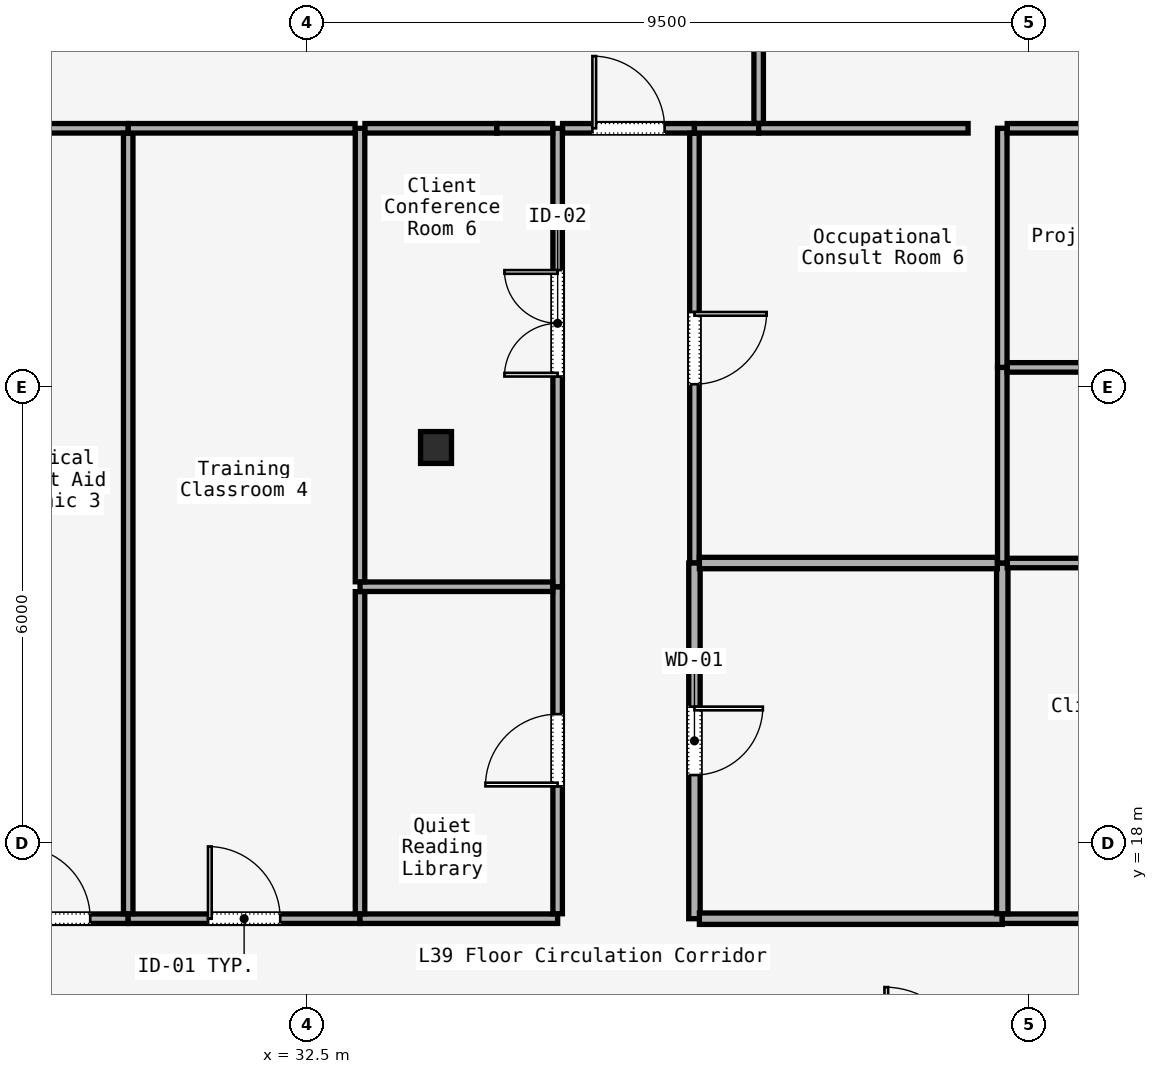
"""IFC4 building model, lengths in metres.
Left out: names, types, materials, properties, quantities, classifications, styles, units other than length and angle.
Written with IfcOpenShell. Run it as: python <this file> out.ifc"""

import sys

from ifc_helpers import new_model, si_unit, direction, frame, frame_2d, origin, origin_2d, place, context, subcontext, project, spatial, rectangle, i_section, extrude, element, fill, save


model = new_model("IFC4")
c1 = context("Model", 3, precision=1e-05, world=origin(), true_north=direction((0.0, 1.0)))
c2 = subcontext(c1, "Body", "Model", "MODEL_VIEW")
j1 = project(units=[si_unit("LENGTHUNIT", "METRE"), si_unit("PLANEANGLEUNIT", "RADIAN")], contexts=[c1])
p1 = place(None, origin())
s1 = spatial("IfcSite", under=j1, at=p1, CompositionType="ELEMENT")
p2 = place(p1, origin())
s2 = spatial("IfcBuilding", under=s1, at=p2, CompositionType="ELEMENT")
p3 = place(p2, frame((0.0, 0.0, 165.0)))
s3 = spatial("IfcBuildingStorey", under=s2, at=p3, CompositionType="ELEMENT", Elevation=165.0)
p4 = place(p3, frame((34.2, 23.2, 0.0), z_axis=(0.0, 0.0, 1.0), x_axis=(1.0, 0.0, 0.0)))
e1 = element("IfcColumn", 1, at=p4, inside=s3, PredefinedType="COLUMN", context=c2, shape_type="SweptSolid", body=[
    extrude(i_section(OverallWidth=0.407, OverallDepth=0.419, WebThickness=0.031, FlangeThickness=0.049, FilletRadius=0.015, at=origin_2d()), origin(), (0.0, 0.0, 1.0), 3.58),
])
p5 = place(p3, frame((28.2, 17.0, 0.0), z_axis=(0.0, 0.0, 1.0), x_axis=(1.0, 0.0, 0.0)))
e2 = element("IfcWall", 2, at=p5, inside=s3, PredefinedType="PARTITIONING", context=c2, shape_type="SweptSolid", body=[
    extrude(rectangle(XDim=1.95, YDim=0.125, at=frame_2d((0.975, 0.0))), origin(), (0.0, 0.0, 1.0), 3.01),
])
p6 = place(p5, frame((0.5, 0.0, 0.0)))
e3 = element("IfcOpeningElement", 3, at=p6, cuts=e2, PredefinedType="OPENING", context=c2, shape_type="SweptSolid", body=[
    extrude(rectangle(XDim=0.95, YDim=2.2, at=frame_2d((0.475, 1.1))), frame((0.0, 0.062, 0.0), z_axis=(0.0, -1.0, 0.0), x_axis=(1.0, 0.0, 0.0)), (0.0, 0.0, 1.0), 0.125),
])
p7 = place(p3, frame((30.15, 17.0, 0.0), z_axis=(0.0, 0.0, 1.0), x_axis=(1.0, 0.0, 0.0)))
e4 = element("IfcWall", 4, at=p7, inside=s3, PredefinedType="PARTITIONING", context=c2, shape_type="SweptSolid", body=[
    extrude(rectangle(XDim=3.05, YDim=0.125, at=frame_2d((1.525, 0.0))), origin(), (0.0, 0.0, 1.0), 3.01),
])
p8 = place(p7, frame((1.05, 0.0, 0.0)))
e5 = element("IfcOpeningElement", 5, at=p8, cuts=e4, PredefinedType="OPENING", context=c2, shape_type="SweptSolid", body=[
    extrude(rectangle(XDim=0.95, YDim=2.2, at=frame_2d((0.475, 1.1))), frame((0.0, 0.062, 0.0), z_axis=(0.0, -1.0, 0.0), x_axis=(1.0, 0.0, 0.0)), (0.0, 0.0, 1.0), 0.125),
])
p9 = place(p3, frame((33.2, 17.0, 0.0), z_axis=(0.0, 0.0, 1.0), x_axis=(1.0, 0.0, 0.0)))
e6 = element("IfcWall", 6, at=p9, inside=s3, PredefinedType="PARTITIONING", context=c2, shape_type="SweptSolid", body=[
    extrude(rectangle(XDim=2.6, YDim=0.125, at=frame_2d((1.3, 0.0))), origin(), (0.0, 0.0, 1.0), 3.01),
])
p10 = place(p3, frame((35.8, 17.065, 0.0), z_axis=(0.0, 0.0, 1.0), x_axis=(0.0, 1.0, 0.0)))
e7 = element("IfcWall", 7, at=p10, inside=s3, PredefinedType="PARTITIONING", context=c2, shape_type="SweptSolid", body=[
    extrude(rectangle(XDim=4.303, YDim=0.125, at=frame_2d((2.151, 0.0))), origin(), (0.0, 0.0, 1.0), 3.01),
])
p11 = place(p10, frame((1.677, 0.0, 0.0)))
e8 = element("IfcOpeningElement", 8, at=p11, cuts=e7, PredefinedType="OPENING", context=c2, shape_type="SweptSolid", body=[
    extrude(rectangle(XDim=0.95, YDim=2.2, at=frame_2d((0.475, 1.1))), frame((0.0, 0.062, 0.0), z_axis=(0.0, -1.0, 0.0), x_axis=(1.0, 0.0, 0.0)), (0.0, 0.0, 1.0), 0.125),
])
p12 = place(p3, frame((35.8, 21.368, 0.0), z_axis=(0.0, 0.0, 1.0), x_axis=(0.0, 1.0, 0.0)))
e9 = element("IfcWall", 9, at=p12, inside=s3, PredefinedType="PARTITIONING", context=c2, shape_type="SweptSolid", body=[
    extrude(rectangle(XDim=6.032, YDim=0.125, at=frame_2d((3.016, 0.0))), origin(), (0.0, 0.0, 1.0), 3.01),
])
p13 = place(p12, frame((2.766, 0.0, 0.0)))
e10 = element("IfcOpeningElement", 10, at=p13, cuts=e9, PredefinedType="OPENING", context=c2, shape_type="SweptSolid", body=[
    extrude(rectangle(XDim=1.4, YDim=2.2, at=frame_2d((0.7, 1.1))), frame((0.0, 0.062, 0.0), z_axis=(0.0, -1.0, 0.0), x_axis=(1.0, 0.0, 0.0)), (0.0, 0.0, 1.0), 0.125),
])
p14 = place(p3, frame((35.865, 27.4, 0.0), z_axis=(0.0, 0.0, 1.0), x_axis=(1.0, 0.0, 0.0)))
e11 = element("IfcWall", 11, at=p14, inside=s3, PredefinedType="PARTITIONING", context=c2, shape_type="SweptSolid", body=[
    extrude(rectangle(XDim=1.735, YDim=0.125, at=frame_2d((0.868, 0.0))), origin(), (0.0, 0.0, 1.0), 3.01),
])
p15 = place(p14, frame((0.393, 0.0, 0.0)))
e12 = element("IfcOpeningElement", 12, at=p15, cuts=e11, PredefinedType="OPENING", context=c2, shape_type="SweptSolid", body=[
    extrude(rectangle(XDim=0.95, YDim=2.2, at=frame_2d((0.475, 1.1))), frame((0.0, 0.062, 0.0), z_axis=(0.0, -1.0, 0.0), x_axis=(1.0, 0.0, 0.0)), (0.0, 0.0, 1.0), 0.125),
])
p16 = place(p3, frame((37.6, 27.335, 0.0), z_axis=(0.0, 0.0, 1.0), x_axis=(0.0, -1.0, 0.0)))
e13 = element("IfcWall", 13, at=p16, inside=s3, PredefinedType="PARTITIONING", context=c2, shape_type="SweptSolid", body=[
    extrude(rectangle(XDim=5.655, YDim=0.125, at=frame_2d((2.828, 0.0))), origin(), (0.0, 0.0, 1.0), 3.01),
])
p17 = place(p16, frame((2.353, 0.0, 0.0)))
e14 = element("IfcOpeningElement", 14, at=p17, cuts=e13, PredefinedType="OPENING", context=c2, shape_type="SweptSolid", body=[
    extrude(rectangle(XDim=0.95, YDim=2.2, at=frame_2d((0.475, 1.1))), frame((0.0, 0.062, 0.0), z_axis=(0.0, -1.0, 0.0), x_axis=(1.0, 0.0, 0.0)), (0.0, 0.0, 1.0), 0.125),
])
p18 = place(p3, frame((37.6, 21.68, 0.0), z_axis=(0.0, 0.0, 1.0), x_axis=(0.0, -1.0, 0.0)))
e15 = element("IfcWall", 15, at=p18, inside=s3, PredefinedType="PARTITIONING", context=c2, shape_type="SweptSolid", body=[
    extrude(rectangle(XDim=4.68, YDim=0.15, at=frame_2d((2.34, 0.0))), origin(), (0.0, 0.0, 1.0), 3.01),
])
p19 = place(p18, frame((1.89, 0.0, 0.0)))
e16 = element("IfcOpeningElement", 16, at=p19, cuts=e15, PredefinedType="OPENING", context=c2, shape_type="SweptSolid", body=[
    extrude(rectangle(XDim=0.9, YDim=2.15, at=frame_2d((0.45, 1.075))), frame((0.0, 0.075, 0.0), z_axis=(0.0, -1.0, 0.0), x_axis=(1.0, 0.0, 0.0)), (0.0, 0.0, 1.0), 0.15),
])
p20 = place(p3, frame((37.665, 17.0, 0.0), z_axis=(0.0, 0.0, 1.0), x_axis=(1.0, 0.0, 0.0)))
e17 = element("IfcWall", 17, at=p20, inside=s3, PredefinedType="PARTITIONING", context=c2, shape_type="SweptSolid", body=[
    extrude(rectangle(XDim=3.985, YDim=0.15, at=frame_2d((1.992, 0.0))), origin(), (0.0, 0.0, 1.0), 3.01),
])
p21 = place(p3, frame((41.65, 17.0, 0.0), z_axis=(0.0, 0.0, 1.0), x_axis=(1.0, 0.0, 0.0)))
e18 = element("IfcWall", 18, at=p21, inside=s3, PredefinedType="PARTITIONING", context=c2, shape_type="SweptSolid", body=[
    extrude(rectangle(XDim=4.95, YDim=0.125, at=frame_2d((2.475, 0.0))), origin(), (0.0, 0.0, 1.0), 3.01),
])
p22 = place(p21, frame((1.775, 0.0, 0.0)))
e19 = element("IfcOpeningElement", 19, at=p22, cuts=e18, PredefinedType="OPENING", context=c2, shape_type="SweptSolid", body=[
    extrude(rectangle(XDim=1.4, YDim=2.2, at=frame_2d((0.7, 1.1))), frame((0.0, 0.062, 0.0), z_axis=(0.0, -1.0, 0.0), x_axis=(1.0, 0.0, 0.0)), (0.0, 0.0, 1.0), 0.125),
])
p23 = place(p3, frame((33.2, 21.368, 0.0), z_axis=(0.0, 0.0, 1.0), x_axis=(1.0, 0.0, 0.0)))
e20 = element("IfcWall", 20, at=p23, inside=s3, PredefinedType="PARTITIONING", context=c2, shape_type="SweptSolid", body=[
    extrude(rectangle(XDim=2.535, YDim=0.125, at=frame_2d((1.268, 0.0))), origin(), (0.0, 0.0, 1.0), 3.01),
])
p24 = place(p3, frame((33.2, 17.065, 0.0), z_axis=(0.0, 0.0, 1.0), x_axis=(0.0, 1.0, 0.0)))
e21 = element("IfcWall", 21, at=p24, inside=s3, PredefinedType="PARTITIONING", context=c2, shape_type="SweptSolid", body=[
    extrude(rectangle(XDim=4.238, YDim=0.125, at=frame_2d((2.119, 0.0))), origin(), (0.0, 0.0, 1.0), 3.01),
])
p25 = place(p3, frame((41.65, 21.68, 0.0), z_axis=(0.0, 0.0, 1.0), x_axis=(0.0, -1.0, 0.0)))
e22 = element("IfcWall", 22, at=p25, inside=s3, PredefinedType="PARTITIONING", context=c2, shape_type="SweptSolid", body=[
    extrude(rectangle(XDim=4.615, YDim=0.15, at=frame_2d((2.308, 0.0))), origin(), (0.0, 0.0, 1.0), 3.01),
])
p26 = place(p3, frame((37.665, 21.68, 0.0), z_axis=(0.0, 0.0, 1.0), x_axis=(1.0, 0.0, 0.0)))
e23 = element("IfcWall", 23, at=p26, inside=s3, PredefinedType="PARTITIONING", context=c2, shape_type="SweptSolid", body=[
    extrude(rectangle(XDim=3.92, YDim=0.15, at=frame_2d((1.96, 0.0))), origin(), (0.0, 0.0, 1.0), 3.01),
])
p27 = place(p3, frame((41.715, 21.68, 0.0), z_axis=(0.0, 0.0, 1.0), x_axis=(1.0, 0.0, 0.0)))
e24 = element("IfcWall", 24, at=p27, inside=s3, PredefinedType="PARTITIONING", context=c2, shape_type="SweptSolid", body=[
    extrude(rectangle(XDim=4.82, YDim=0.125, at=frame_2d((2.41, 0.0))), origin(), (0.0, 0.0, 1.0), 3.01),
])
p28 = place(p3, frame((28.2, 27.4, 0.0), z_axis=(0.0, 0.0, 1.0), x_axis=(1.0, 0.0, 0.0)))
e25 = element("IfcWall", 25, at=p28, inside=s3, PredefinedType="PARTITIONING", context=c2, shape_type="SweptSolid", body=[
    extrude(rectangle(XDim=1.95, YDim=0.125, at=frame_2d((0.975, 0.0))), origin(), (0.0, 0.0, 1.0), 3.01),
])
p29 = place(p3, frame((30.15, 27.335, 0.0), z_axis=(0.0, 0.0, 1.0), x_axis=(0.0, -1.0, 0.0)))
e26 = element("IfcWall", 26, at=p29, inside=s3, PredefinedType="PARTITIONING", context=c2, shape_type="SweptSolid", body=[
    extrude(rectangle(XDim=10.27, YDim=0.125, at=frame_2d((5.135, 0.0))), origin(), (0.0, 0.0, 1.0), 3.01),
])
p30 = place(p3, frame((33.2, 27.4, 0.0), z_axis=(0.0, 0.0, 1.0), x_axis=(0.0, -1.0, 0.0)))
e27 = element("IfcWall", 27, at=p30, inside=s3, PredefinedType="PARTITIONING", context=c2, shape_type="SweptSolid", body=[
    extrude(rectangle(XDim=5.967, YDim=0.125, at=frame_2d((2.983, 0.0))), origin(), (0.0, 0.0, 1.0), 3.01),
])
p31 = place(p3, frame((30.15, 27.4, 0.0), z_axis=(0.0, 0.0, 1.0), x_axis=(1.0, 0.0, 0.0)))
e28 = element("IfcWall", 28, at=p31, inside=s3, PredefinedType="PARTITIONING", context=c2, shape_type="SweptSolid", body=[
    extrude(rectangle(XDim=2.985, YDim=0.125, at=frame_2d((1.493, 0.0))), origin(), (0.0, 0.0, 1.0), 3.01),
])
p32 = place(p3, frame((41.65, 21.68, 0.0), z_axis=(0.0, 0.0, 1.0), x_axis=(0.0, 1.0, 0.0)))
e29 = element("IfcWall", 29, at=p32, inside=s3, PredefinedType="PARTITIONING", context=c2, shape_type="SweptSolid", body=[
    extrude(rectangle(XDim=2.574, YDim=0.125, at=frame_2d((1.287, 0.0))), origin(), (0.0, 0.0, 1.0), 3.01),
])
p33 = place(p3, frame((41.715, 24.254, 0.0), z_axis=(0.0, 0.0, 1.0), x_axis=(1.0, 0.0, 0.0)))
e30 = element("IfcWall", 30, at=p33, inside=s3, PredefinedType="PARTITIONING", context=c2, shape_type="SweptSolid", body=[
    extrude(rectangle(XDim=4.82, YDim=0.125, at=frame_2d((2.41, 0.0))), origin(), (0.0, 0.0, 1.0), 3.01),
])
p34 = place(p3, frame((33.265, 27.4, 0.0), z_axis=(0.0, 0.0, 1.0), x_axis=(1.0, 0.0, 0.0)))
e31 = element("IfcWall", 31, at=p34, inside=s3, PredefinedType="PARTITIONING", context=c2, shape_type="SweptSolid", body=[
    extrude(rectangle(XDim=1.735, YDim=0.125, at=frame_2d((0.868, 0.0))), origin(), (0.0, 0.0, 1.0), 3.01),
])
p35 = place(p3, frame((35.0, 27.4, 0.0), z_axis=(0.0, 0.0, 1.0), x_axis=(1.0, 0.0, 0.0)))
e32 = element("IfcWall", 32, at=p35, inside=s3, PredefinedType="PARTITIONING", context=c2, shape_type="SweptSolid", body=[
    extrude(rectangle(XDim=0.735, YDim=0.125, at=frame_2d((0.368, 0.0))), origin(), (0.0, 0.0, 1.0), 3.01),
])
p36 = place(p3, frame((41.65, 27.4, 0.0), z_axis=(0.0, 0.0, 1.0), x_axis=(0.0, -1.0, 0.0)))
e33 = element("IfcWall", 33, at=p36, inside=s3, PredefinedType="PARTITIONING", context=c2, shape_type="SweptSolid", body=[
    extrude(rectangle(XDim=3.146, YDim=0.125, at=frame_2d((1.573, 0.0))), origin(), (0.0, 0.0, 1.0), 3.01),
])
p37 = place(p3, frame((37.6, 27.4, 0.0), z_axis=(0.0, 0.0, 1.0), x_axis=(1.0, 0.0, 0.0)))
e34 = element("IfcWall", 34, at=p37, inside=s3, PredefinedType="PARTITIONING", context=c2, shape_type="SweptSolid", body=[
    extrude(rectangle(XDim=0.845, YDim=0.125, at=frame_2d((0.422, 0.0))), origin(), (0.0, 0.0, 1.0), 3.01),
])
p38 = place(p3, frame((38.445, 27.4, 0.0), z_axis=(0.0, 0.0, 1.0), x_axis=(1.0, 0.0, 0.0)))
e35 = element("IfcWall", 35, at=p38, inside=s3, PredefinedType="PARTITIONING", context=c2, shape_type="SweptSolid", body=[
    extrude(rectangle(XDim=2.755, YDim=0.125, at=frame_2d((1.377, 0.0))), origin(), (0.0, 0.0, 1.0), 3.01),
])
p39 = place(p3, frame((41.715, 27.4, 0.0), z_axis=(0.0, 0.0, 1.0), x_axis=(1.0, 0.0, 0.0)))
e36 = element("IfcWall", 36, at=p39, inside=s3, PredefinedType="PARTITIONING", context=c2, shape_type="SweptSolid", body=[
    extrude(rectangle(XDim=4.82, YDim=0.125, at=frame_2d((2.41, 0.0))), origin(), (0.0, 0.0, 1.0), 3.01),
])
p40 = place(p3, frame((38.445, 46.202, 0.0), z_axis=(0.0, 0.0, 1.0), x_axis=(0.0, -1.0, 0.0)))
e37 = element("IfcWall", 37, at=p40, inside=s3, PredefinedType="PARTITIONING", context=c2, shape_type="SweptSolid", body=[
    extrude(rectangle(XDim=18.737, YDim=0.125, at=frame_2d((9.368, 0.0))), origin(), (0.0, 0.0, 1.0), 3.01),
])
p41 = place(p11, origin())
e38 = element("IfcDoor", 38, at=p41, inside=s3, OperationType="SINGLE_SWING_LEFT", PredefinedType="DOOR", context=c2, shape_type="SweptSolid", body=[
    extrude(rectangle(XDim=0.95, YDim=2.2, at=frame_2d((0.475, 1.1))), frame((0.0, 0.025, 0.0), z_axis=(0.0, -1.0, 0.0), x_axis=(1.0, 0.0, 0.0)), (0.0, 0.0, 1.0), 0.05),
])
fill(e8, e38)
p42 = place(p19, origin())
e39 = element("IfcDoor", 39, at=p42, inside=s3, OperationType="SINGLE_SWING_RIGHT", PredefinedType="DOOR", context=c2, shape_type="SweptSolid", body=[
    extrude(rectangle(XDim=0.9, YDim=2.15, at=frame_2d((0.45, 1.075))), frame((0.0, 0.025, 0.0), z_axis=(0.0, -1.0, 0.0), x_axis=(1.0, 0.0, 0.0)), (0.0, 0.0, 1.0), 0.05),
])
fill(e16, e39)
p43 = place(p6, origin())
e40 = element("IfcDoor", 40, at=p43, inside=s3, OperationType="SINGLE_SWING_RIGHT", PredefinedType="DOOR", context=c2, shape_type="SweptSolid", body=[
    extrude(rectangle(XDim=0.95, YDim=2.2, at=frame_2d((0.475, 1.1))), frame((0.0, 0.025, 0.0), z_axis=(0.0, -1.0, 0.0), x_axis=(1.0, 0.0, 0.0)), (0.0, 0.0, 1.0), 0.05),
])
fill(e3, e40)
p44 = place(p8, origin())
e41 = element("IfcDoor", 41, at=p44, inside=s3, OperationType="SINGLE_SWING_LEFT", PredefinedType="DOOR", context=c2, shape_type="SweptSolid", body=[
    extrude(rectangle(XDim=0.95, YDim=2.2, at=frame_2d((0.475, 1.1))), frame((0.0, 0.025, 0.0), z_axis=(0.0, -1.0, 0.0), x_axis=(1.0, 0.0, 0.0)), (0.0, 0.0, 1.0), 0.05),
])
fill(e5, e41)
p45 = place(p13, origin())
e42 = element("IfcDoor", 42, at=p45, inside=s3, OperationType="SINGLE_SWING_RIGHT", PredefinedType="DOOR", context=c2, shape_type="SweptSolid", body=[
    extrude(rectangle(XDim=1.4, YDim=2.2, at=frame_2d((0.7, 1.1))), frame((0.0, 0.025, 0.0), z_axis=(0.0, -1.0, 0.0), x_axis=(1.0, 0.0, 0.0)), (0.0, 0.0, 1.0), 0.05),
])
fill(e10, e42)
p46 = place(p17, origin())
e43 = element("IfcDoor", 43, at=p46, inside=s3, OperationType="SINGLE_SWING_LEFT", PredefinedType="DOOR", context=c2, shape_type="SweptSolid", body=[
    extrude(rectangle(XDim=0.95, YDim=2.2, at=frame_2d((0.475, 1.1))), frame((0.0, 0.025, 0.0), z_axis=(0.0, -1.0, 0.0), x_axis=(1.0, 0.0, 0.0)), (0.0, 0.0, 1.0), 0.05),
])
fill(e14, e43)
p47 = place(p15, origin())
e44 = element("IfcDoor", 44, at=p47, inside=s3, OperationType="SINGLE_SWING_LEFT", PredefinedType="DOOR", context=c2, shape_type="SweptSolid", body=[
    extrude(rectangle(XDim=0.95, YDim=2.2, at=frame_2d((0.475, 1.1))), frame((0.0, 0.025, 0.0), z_axis=(0.0, -1.0, 0.0), x_axis=(1.0, 0.0, 0.0)), (0.0, 0.0, 1.0), 0.05),
])
fill(e12, e44)
save(model, sys.argv[1])
